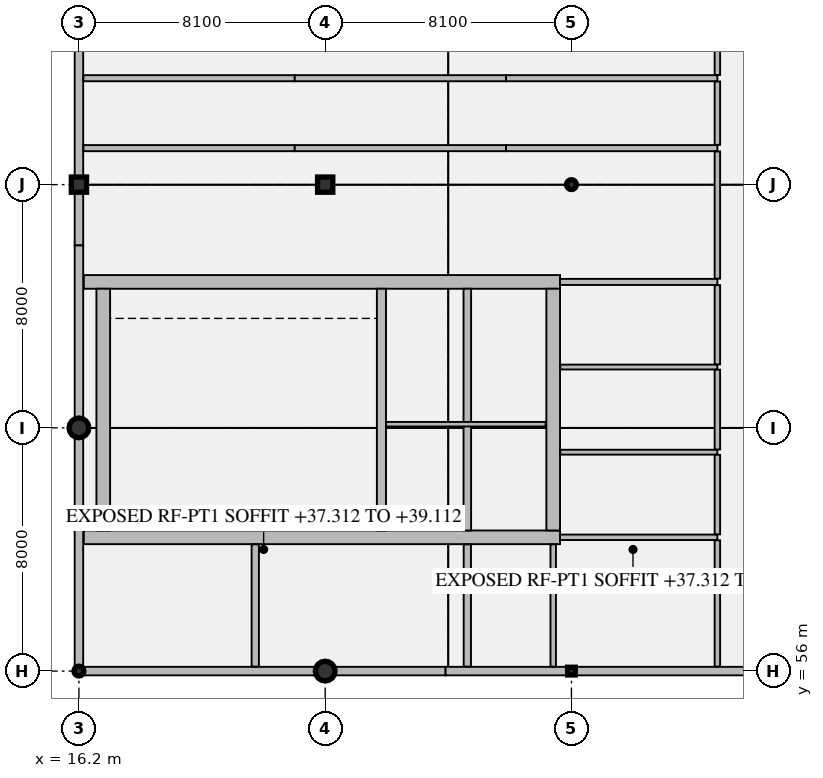
"""IFC4 building model, lengths in metres.
Left out: names, types, materials, properties, quantities, classifications, styles, units other than length and angle.
Written with IfcOpenShell. Run it as: python <this file> out.ifc"""

import sys

from ifc_helpers import new_model, si_unit, direction, frame, frame_2d, origin, origin_2d, place, context, subcontext, project, spatial, rectangle, hollow_rectangle, circle, hollow_circle, extrude, element, fill, save


model = new_model("IFC4")
c1 = context("Model", 3, precision=1e-05, world=origin(), true_north=direction((0.0, 1.0)))
c2 = subcontext(c1, "Body", "Model", "MODEL_VIEW")
j1 = project(units=[si_unit("LENGTHUNIT", "METRE"), si_unit("PLANEANGLEUNIT", "RADIAN")], contexts=[c1])
p1 = place(None, origin())
s1 = spatial("IfcSite", under=j1, at=p1, CompositionType="ELEMENT")
p2 = place(p1, origin())
s2 = spatial("IfcBuilding", under=s1, at=p2, CompositionType="ELEMENT")
p3 = place(p2, frame((0.0, 0.0, 33.3)))
s3 = spatial("IfcBuildingStorey", under=s2, at=p3, CompositionType="ELEMENT", Elevation=33.3)
p4 = place(p3, frame((16.36, 60.4, 0.0), z_axis=(0.0, 0.0, 1.0), x_axis=(1.0, 0.0, 0.0)))
e1 = element("IfcWall", 1, at=p4, inside=s3, PredefinedType="SHEAR", context=c2, shape_type="SweptSolid", body=[
    extrude(rectangle(XDim=15.665, YDim=0.45, at=frame_2d((7.833, 0.0))), origin(), (0.0, 0.0, 1.0), 3.98),
])
p5 = place(p4, frame((1.39, 0.0, 0.0)))
e2 = element("IfcOpeningElement", 2, at=p5, cuts=e1, PredefinedType="OPENING", context=c2, shape_type="SweptSolid", body=[
    extrude(rectangle(XDim=1.15, YDim=2.25, at=frame_2d((0.575, 1.125))), frame((0.0, 0.235, 0.0), z_axis=(0.0, -1.0, 0.0), x_axis=(1.0, 0.0, 0.0)), (0.0, 0.0, 1.0), 0.47),
])
p6 = place(p4, frame((10.673, 0.0, 0.0)))
e3 = element("IfcOpeningElement", 3, at=p6, cuts=e1, PredefinedType="OPENING", context=c2, shape_type="SweptSolid", body=[
    extrude(rectangle(XDim=1.1, YDim=2.2, at=frame_2d((0.55, 1.1))), frame((0.0, 0.235, 0.0), z_axis=(0.0, -1.0, 0.0), x_axis=(1.0, 0.0, 0.0)), (0.0, 0.0, 1.0), 0.47),
])
p7 = place(p4, frame((13.387, 0.0, 0.0)))
e4 = element("IfcOpeningElement", 4, at=p7, cuts=e1, PredefinedType="OPENING", context=c2, shape_type="SweptSolid", body=[
    extrude(rectangle(XDim=1.1, YDim=2.2, at=frame_2d((0.55, 1.1))), frame((0.0, 0.235, 0.0), z_axis=(0.0, -1.0, 0.0), x_axis=(1.0, 0.0, 0.0)), (0.0, 0.0, 1.0), 0.47),
])
p8 = place(p3, frame((16.36, 68.8, 0.0), z_axis=(0.0, 0.0, 1.0), x_axis=(1.0, 0.0, 0.0)))
e5 = element("IfcWall", 5, at=p8, inside=s3, PredefinedType="SHEAR", context=c2, shape_type="SweptSolid", body=[
    extrude(rectangle(XDim=15.665, YDim=0.45, at=frame_2d((7.833, 0.0))), origin(), (0.0, 0.0, 1.0), 3.98),
])
for number, where, z_axis, x_axis in (
    (6, (17.0, 60.625, 0.0), (0.0, 0.0, 1.0), (0.0, 1.0, 0.0)),
    (7, (31.8, 60.625, 0.0), (0.0, 0.0, 1.0), (0.0, 1.0, 0.0)),
):
    element("IfcWall", number, at=place(p3, frame(where, z_axis=z_axis, x_axis=x_axis)), inside=s3, PredefinedType="SHEAR", context=c2, shape_type="SweptSolid", body=[
        extrude(rectangle(XDim=7.95, YDim=0.45, at=frame_2d((3.975, 0.0))), origin(), (0.0, 0.0, 1.0), 3.98),
    ])
p9 = place(p3, frame((26.15, 60.625, 0.0), z_axis=(0.0, 0.0, 1.0), x_axis=(0.0, 1.0, 0.0)))
e8 = element("IfcWall", 8, at=p9, inside=s3, PredefinedType="SHEAR", context=c2, shape_type="SweptSolid", body=[
    extrude(rectangle(XDim=7.95, YDim=0.3, at=frame_2d((3.975, 0.0))), origin(), (0.0, 0.0, 1.0), 3.98),
])
p10 = place(p3, frame((28.975, 60.625, 0.0), z_axis=(0.0, 0.0, 1.0), x_axis=(0.0, 1.0, 0.0)))
e9 = element("IfcWall", 9, at=p10, inside=s3, PredefinedType="SHEAR", context=c2, shape_type="SweptSolid", body=[
    extrude(rectangle(XDim=7.95, YDim=0.25, at=frame_2d((3.975, 0.0))), origin(), (0.0, 0.0, 1.0), 3.98),
])
p11 = place(p3, frame((16.2, 56.0, 0.0), z_axis=(0.0, 0.0, 1.0), x_axis=(1.0, 0.0, 0.0)))
e10 = element("IfcColumn", 10, at=p11, inside=s3, PredefinedType="COLUMN", context=c2, shape_type="SweptSolid", body=[
    extrude(hollow_circle(Radius=0.162, WallThickness=0.013, at=origin_2d()), origin(), (0.0, 0.0, 1.0), 3.98),
])
p12 = place(p3, frame((16.2, 64.0, 0.0), z_axis=(0.0, 0.0, 1.0), x_axis=(1.0, 0.0, 0.0)))
e11 = element("IfcColumn", 11, at=p12, inside=s3, PredefinedType="COLUMN", context=c2, shape_type="SweptSolid", body=[
    extrude(circle(Radius=0.325, at=origin_2d()), origin(), (0.0, 0.0, 1.0), 3.98),
])
p13 = place(p3, frame((16.2, 72.0, 0.0), z_axis=(0.0, 0.0, 1.0), x_axis=(1.0, 0.0, 0.0)))
e12 = element("IfcColumn", 12, at=p13, inside=s3, PredefinedType="COLUMN", context=c2, shape_type="SweptSolid", body=[
    extrude(rectangle(XDim=0.5, YDim=0.5, at=origin_2d()), origin(), (0.0, 0.0, 1.0), 3.98),
])
p14 = place(p3, frame((24.3, 56.0, 0.0), z_axis=(0.0, 0.0, 1.0), x_axis=(1.0, 0.0, 0.0)))
e13 = element("IfcColumn", 13, at=p14, inside=s3, PredefinedType="COLUMN", context=c2, shape_type="SweptSolid", body=[
    extrude(circle(Radius=0.325, at=origin_2d()), origin(), (0.0, 0.0, 1.0), 3.98),
])
p15 = place(p3, frame((24.3, 72.0, 0.0), z_axis=(0.0, 0.0, 1.0), x_axis=(1.0, 0.0, 0.0)))
e14 = element("IfcColumn", 14, at=p15, inside=s3, PredefinedType="COLUMN", context=c2, shape_type="SweptSolid", body=[
    extrude(rectangle(XDim=0.5, YDim=0.5, at=origin_2d()), origin(), (0.0, 0.0, 1.0), 3.98),
])
p16 = place(p3, frame((32.4, 56.0, 0.0), z_axis=(0.0, 0.0, 1.0), x_axis=(1.0, 0.0, 0.0)))
e15 = element("IfcColumn", 15, at=p16, inside=s3, PredefinedType="COLUMN", context=c2, shape_type="SweptSolid", body=[
    extrude(hollow_rectangle(XDim=0.254, YDim=0.254, WallThickness=0.013, InnerFilletRadius=0.013, OuterFilletRadius=0.025, at=origin_2d()), origin(), (0.0, 0.0, 1.0), 3.98),
])
p17 = place(p3, frame((32.4, 72.0, 0.0), z_axis=(0.0, 0.0, 1.0), x_axis=(1.0, 0.0, 0.0)))
e16 = element("IfcColumn", 16, at=p17, inside=s3, PredefinedType="COLUMN", context=c2, shape_type="SweptSolid", body=[
    extrude(hollow_circle(Radius=0.162, WallThickness=0.013, at=origin_2d()), origin(), (0.0, 0.0, 1.0), 3.98),
])
for number, where, z_axis, x_axis in (
    (17, (16.2, 84.0, 0.0), (0.0, 0.0, 1.0), (0.0, -1.0, 0.0)),
    (18, (16.2, 70.0, 0.0), (0.0, 0.0, 1.0), (0.0, -1.0, 0.0)),
):
    element("IfcWall", number, at=place(p3, frame(where, z_axis=z_axis, x_axis=x_axis)), inside=s3, PredefinedType="SOLIDWALL", context=c2, shape_type="SweptSolid", body=[
        extrude(rectangle(XDim=14.0, YDim=0.28, at=frame_2d((7.0, 0.0))), origin(), (0.0, 0.0, 1.0), 3.655),
    ])
p18 = place(p3, frame((16.2, 56.0, 0.0), z_axis=(0.0, 0.0, 1.0), x_axis=(1.0, 0.0, 0.0)))
e19 = element("IfcWall", 19, at=p18, inside=s3, PredefinedType="SOLIDWALL", context=c2, shape_type="SweptSolid", body=[
    extrude(rectangle(XDim=12.06, YDim=0.28, at=frame_2d((6.03, 0.0))), origin(), (0.0, 0.0, 1.0), 3.655),
])
p19 = place(p18, frame((3.15, 0.0, 0.95)))
e20 = element("IfcOpeningElement", 20, at=p19, cuts=e19, PredefinedType="OPENING", context=c2, shape_type="SweptSolid", body=[
    extrude(rectangle(XDim=1.8, YDim=1.8, at=frame_2d((0.9, 0.9))), frame((0.0, 0.15, 0.0), z_axis=(0.0, -1.0, 0.0), x_axis=(1.0, 0.0, 0.0)), (0.0, 0.0, 1.0), 0.3),
])
p20 = place(p3, frame((28.26, 56.0, 0.0), z_axis=(0.0, 0.0, 1.0), x_axis=(1.0, 0.0, 0.0)))
e21 = element("IfcWall", 21, at=p20, inside=s3, PredefinedType="SOLIDWALL", context=c2, shape_type="SweptSolid", body=[
    extrude(rectangle(XDim=12.06, YDim=0.28, at=frame_2d((6.03, 0.0))), origin(), (0.0, 0.0, 1.0), 3.655),
])
p21 = place(p3, frame((18.0, 68.8, 3.98), z_axis=(0.0, 0.0, 1.0), x_axis=(1.0, 0.0, 0.0)))
e22 = element("IfcWall", 22, at=p21, inside=s3, PredefinedType="PARAPET", context=c2, shape_type="SweptSolid", body=[
    extrude(rectangle(XDim=12.8, YDim=0.22, at=frame_2d((6.4, 0.0))), origin(), (0.0, 0.0, 1.0), 2.17),
])
p22 = place(p3, frame((26.3, 64.12, 0.0), z_axis=(0.0, 0.0, 1.0), x_axis=(1.0, 0.0, 0.0)))
e23 = element("IfcWall", 23, at=p22, inside=s3, PredefinedType="PARTITIONING", context=c2, shape_type="SweptSolid", body=[
    extrude(rectangle(XDim=5.25, YDim=0.15, at=frame_2d((2.625, 0.0))), origin(), (0.0, 0.0, 1.0), 3.98),
])
for number, where, z_axis, x_axis in (
    (24, (16.348, 73.2, 0.0), (0.0, 0.0, 1.0), (1.0, 0.0, 0.0)),
    (25, (23.299, 73.2, 0.0), (0.0, 0.0, 1.0), (1.0, 0.0, 0.0)),
    (26, (30.249, 73.2, 0.0), (0.0, 0.0, 1.0), (1.0, 0.0, 0.0)),
    (27, (16.348, 75.5, 0.0), (0.0, 0.0, 1.0), (1.0, 0.0, 0.0)),
    (28, (23.299, 75.5, 0.0), (0.0, 0.0, 1.0), (1.0, 0.0, 0.0)),
    (29, (30.249, 75.5, 0.0), (0.0, 0.0, 1.0), (1.0, 0.0, 0.0)),
):
    element("IfcWall", number, at=place(p3, frame(where, z_axis=z_axis, x_axis=x_axis)), inside=s3, PredefinedType="PARTITIONING", context=c2, shape_type="SweptSolid", body=[
        extrude(rectangle(XDim=6.951, YDim=0.2, at=frame_2d((3.475, 0.0))), origin(), (0.0, 0.0, 1.0), 3.98),
    ])
p23 = place(p3, frame((32.025, 60.4, 0.0), z_axis=(0.0, 0.0, 1.0), x_axis=(1.0, 0.0, 0.0)))
e30 = element("IfcWall", 30, at=p23, inside=s3, PredefinedType="PARTITIONING", context=c2, shape_type="SweptSolid", body=[
    extrude(rectangle(XDim=5.175, YDim=0.18, at=frame_2d((2.587, 0.0))), origin(), (0.0, 0.0, 1.0), 3.98),
])
for number, where, z_axis, x_axis in (
    (31, (32.033, 63.2, 0.0), (0.0, 0.0, 1.0), (1.0, 0.0, 0.0)),
    (32, (32.033, 66.0, 0.0), (0.0, 0.0, 1.0), (1.0, 0.0, 0.0)),
):
    element("IfcWall", number, at=place(p3, frame(where, z_axis=z_axis, x_axis=x_axis)), inside=s3, PredefinedType="PARTITIONING", context=c2, shape_type="SweptSolid", body=[
        extrude(rectangle(XDim=5.167, YDim=0.16, at=frame_2d((2.583, 0.0))), origin(), (0.0, 0.0, 1.0), 3.98),
    ])
p24 = place(p3, frame((32.025, 68.8, 0.0), z_axis=(0.0, 0.0, 1.0), x_axis=(1.0, 0.0, 0.0)))
e33 = element("IfcWall", 33, at=p24, inside=s3, PredefinedType="PARTITIONING", context=c2, shape_type="SweptSolid", body=[
    extrude(rectangle(XDim=5.175, YDim=0.2, at=frame_2d((2.587, 0.0))), origin(), (0.0, 0.0, 1.0), 3.98),
])
p25 = place(p3, frame((22.0, 56.148, 0.0), z_axis=(0.0, 0.0, 1.0), x_axis=(0.0, 1.0, 0.0)))
e34 = element("IfcWall", 34, at=p25, inside=s3, PredefinedType="PARTITIONING", context=c2, shape_type="SweptSolid", body=[
    extrude(rectangle(XDim=4.019, YDim=0.24, at=frame_2d((2.01, 0.0))), origin(), (0.0, 0.0, 1.0), 3.98),
])
p26 = place(p25, frame((1.459, 0.0, 0.0)))
e35 = element("IfcOpeningElement", 35, at=p26, cuts=e34, PredefinedType="OPENING", context=c2, shape_type="SweptSolid", body=[
    extrude(rectangle(XDim=1.1, YDim=2.2, at=frame_2d((0.55, 1.1))), frame((0.0, 0.13, 0.0), z_axis=(0.0, -1.0, 0.0), x_axis=(1.0, 0.0, 0.0)), (0.0, 0.0, 1.0), 0.26),
])
p27 = place(p3, frame((28.975, 56.148, 0.0), z_axis=(0.0, 0.0, 1.0), x_axis=(0.0, 1.0, 0.0)))
e36 = element("IfcWall", 36, at=p27, inside=s3, PredefinedType="PARTITIONING", context=c2, shape_type="SweptSolid", body=[
    extrude(rectangle(XDim=4.019, YDim=0.24, at=frame_2d((2.01, 0.0))), origin(), (0.0, 0.0, 1.0), 3.98),
])
p28 = place(p3, frame((31.8, 56.148, 0.0), z_axis=(0.0, 0.0, 1.0), x_axis=(0.0, 1.0, 0.0)))
e37 = element("IfcWall", 37, at=p28, inside=s3, PredefinedType="PARTITIONING", context=c2, shape_type="SweptSolid", body=[
    extrude(rectangle(XDim=4.019, YDim=0.18, at=frame_2d((2.01, 0.0))), origin(), (0.0, 0.0, 1.0), 3.98),
])
p29 = place(p28, frame((1.459, 0.0, 0.0)))
e38 = element("IfcOpeningElement", 38, at=p29, cuts=e37, PredefinedType="OPENING", context=c2, shape_type="SweptSolid", body=[
    extrude(rectangle(XDim=1.1, YDim=2.2, at=frame_2d((0.55, 1.1))), frame((0.0, 0.1, 0.0), z_axis=(0.0, -1.0, 0.0), x_axis=(1.0, 0.0, 0.0)), (0.0, 0.0, 1.0), 0.2),
])
p30 = place(p3, frame((37.2, 56.148, 0.0), z_axis=(0.0, 0.0, 1.0), x_axis=(0.0, 1.0, 0.0)))
e39 = element("IfcWall", 39, at=p30, inside=s3, PredefinedType="PARTITIONING", context=c2, shape_type="SweptSolid", body=[
    extrude(rectangle(XDim=4.154, YDim=0.18, at=frame_2d((2.077, 0.0))), origin(), (0.0, 0.0, 1.0), 3.98),
])
p31 = place(p30, frame((1.527, 0.0, 0.0)))
e40 = element("IfcOpeningElement", 40, at=p31, cuts=e39, PredefinedType="OPENING", context=c2, shape_type="SweptSolid", body=[
    extrude(rectangle(XDim=1.1, YDim=2.2, at=frame_2d((0.55, 1.1))), frame((0.0, 0.1, 0.0), z_axis=(0.0, -1.0, 0.0), x_axis=(1.0, 0.0, 0.0)), (0.0, 0.0, 1.0), 0.2),
])
p32 = place(p3, frame((37.2, 60.498, 0.0), z_axis=(0.0, 0.0, 1.0), x_axis=(0.0, 1.0, 0.0)))
e41 = element("IfcWall", 41, at=p32, inside=s3, PredefinedType="PARTITIONING", context=c2, shape_type="SweptSolid", body=[
    extrude(rectangle(XDim=2.614, YDim=0.18, at=frame_2d((1.307, 0.0))), origin(), (0.0, 0.0, 1.0), 3.98),
])
p33 = place(p32, frame((0.832, 0.0, 0.0)))
e42 = element("IfcOpeningElement", 42, at=p33, cuts=e41, PredefinedType="OPENING", context=c2, shape_type="SweptSolid", body=[
    extrude(rectangle(XDim=0.95, YDim=2.1, at=frame_2d((0.475, 1.05))), frame((0.0, 0.1, 0.0), z_axis=(0.0, -1.0, 0.0), x_axis=(1.0, 0.0, 0.0)), (0.0, 0.0, 1.0), 0.2),
])
p34 = place(p3, frame((37.2, 63.288, 0.0), z_axis=(0.0, 0.0, 1.0), x_axis=(0.0, 1.0, 0.0)))
e43 = element("IfcWall", 43, at=p34, inside=s3, PredefinedType="PARTITIONING", context=c2, shape_type="SweptSolid", body=[
    extrude(rectangle(XDim=2.624, YDim=0.18, at=frame_2d((1.312, 0.0))), origin(), (0.0, 0.0, 1.0), 3.98),
])
p35 = place(p34, frame((0.837, 0.0, 0.0)))
e44 = element("IfcOpeningElement", 44, at=p35, cuts=e43, PredefinedType="OPENING", context=c2, shape_type="SweptSolid", body=[
    extrude(rectangle(XDim=0.95, YDim=2.1, at=frame_2d((0.475, 1.05))), frame((0.0, 0.1, 0.0), z_axis=(0.0, -1.0, 0.0), x_axis=(1.0, 0.0, 0.0)), (0.0, 0.0, 1.0), 0.2),
])
p36 = place(p3, frame((37.2, 66.088, 0.0), z_axis=(0.0, 0.0, 1.0), x_axis=(0.0, 1.0, 0.0)))
e45 = element("IfcWall", 45, at=p36, inside=s3, PredefinedType="PARTITIONING", context=c2, shape_type="SweptSolid", body=[
    extrude(rectangle(XDim=2.604, YDim=0.18, at=frame_2d((1.302, 0.0))), origin(), (0.0, 0.0, 1.0), 3.98),
])
p37 = place(p36, frame((0.802, 0.0, 0.0)))
e46 = element("IfcOpeningElement", 46, at=p37, cuts=e45, PredefinedType="OPENING", context=c2, shape_type="SweptSolid", body=[
    extrude(rectangle(XDim=1.0, YDim=2.15, at=frame_2d((0.5, 1.075))), frame((0.0, 0.1, 0.0), z_axis=(0.0, -1.0, 0.0), x_axis=(1.0, 0.0, 0.0)), (0.0, 0.0, 1.0), 0.2),
])
p38 = place(p3, frame((37.2, 68.908, 0.0), z_axis=(0.0, 0.0, 1.0), x_axis=(0.0, 1.0, 0.0)))
e47 = element("IfcWall", 47, at=p38, inside=s3, PredefinedType="PARTITIONING", context=c2, shape_type="SweptSolid", body=[
    extrude(rectangle(XDim=4.184, YDim=0.18, at=frame_2d((2.092, 0.0))), origin(), (0.0, 0.0, 1.0), 3.98),
])
p39 = place(p38, frame((1.542, 0.0, 0.0)))
e48 = element("IfcOpeningElement", 48, at=p39, cuts=e47, PredefinedType="OPENING", context=c2, shape_type="SweptSolid", body=[
    extrude(rectangle(XDim=1.1, YDim=2.2, at=frame_2d((0.55, 1.1))), frame((0.0, 0.1, 0.0), z_axis=(0.0, -1.0, 0.0), x_axis=(1.0, 0.0, 0.0)), (0.0, 0.0, 1.0), 0.2),
])
p40 = place(p3, frame((37.2, 73.308, 0.0), z_axis=(0.0, 0.0, 1.0), x_axis=(0.0, 1.0, 0.0)))
e49 = element("IfcWall", 49, at=p40, inside=s3, PredefinedType="PARTITIONING", context=c2, shape_type="SweptSolid", body=[
    extrude(rectangle(XDim=2.084, YDim=0.18, at=frame_2d((1.042, 0.0))), origin(), (0.0, 0.0, 1.0), 3.98),
])
p41 = place(p40, frame((0.492, 0.0, 0.0)))
e50 = element("IfcOpeningElement", 50, at=p41, cuts=e49, PredefinedType="OPENING", context=c2, shape_type="SweptSolid", body=[
    extrude(rectangle(XDim=1.1, YDim=2.2, at=frame_2d((0.55, 1.1))), frame((0.0, 0.1, 0.0), z_axis=(0.0, -1.0, 0.0), x_axis=(1.0, 0.0, 0.0)), (0.0, 0.0, 1.0), 0.2),
])
p42 = place(p3, frame((37.2, 75.608, 0.0), z_axis=(0.0, 0.0, 1.0), x_axis=(0.0, 1.0, 0.0)))
e51 = element("IfcWall", 51, at=p42, inside=s3, PredefinedType="PARTITIONING", context=c2, shape_type="SweptSolid", body=[
    extrude(rectangle(XDim=6.329, YDim=0.18, at=frame_2d((3.165, 0.0))), origin(), (0.0, 0.0, 1.0), 3.98),
])
p43 = place(p42, frame((2.665, 0.0, 0.0)))
e52 = element("IfcOpeningElement", 52, at=p43, cuts=e51, PredefinedType="OPENING", context=c2, shape_type="SweptSolid", body=[
    extrude(rectangle(XDim=1.0, YDim=2.2, at=frame_2d((0.5, 1.1))), frame((0.0, 0.1, 0.0), z_axis=(0.0, -1.0, 0.0), x_axis=(1.0, 0.0, 0.0)), (0.0, 0.0, 1.0), 0.2),
])
p44 = place(p19, origin())
e53 = element("IfcWindow", 53, at=p44, inside=s3, PartitioningType="DOUBLE_PANEL_VERTICAL", PredefinedType="WINDOW", context=c2, shape_type="SweptSolid", body=[
    extrude(rectangle(XDim=1.8, YDim=1.8, at=frame_2d((0.9, 0.9))), frame((0.0, 0.03, 0.0), z_axis=(0.0, -1.0, 0.0), x_axis=(1.0, 0.0, 0.0)), (0.0, 0.0, 1.0), 0.06),
])
fill(e20, e53)
p45 = place(p5, origin())
e54 = element("IfcDoor", 54, at=p45, inside=s3, OperationType="SINGLE_SWING_LEFT", PredefinedType="DOOR", context=c2, shape_type="SweptSolid", body=[
    extrude(rectangle(XDim=1.15, YDim=2.25, at=frame_2d((0.575, 1.125))), frame((0.0, 0.025, 0.0), z_axis=(0.0, -1.0, 0.0), x_axis=(1.0, 0.0, 0.0)), (0.0, 0.0, 1.0), 0.05),
])
fill(e2, e54)
p46 = place(p6, frame((1.1, 0.0, 0.0), z_axis=(0.0, 0.0, 1.0), x_axis=(-1.0, 0.0, 0.0)))
e55 = element("IfcDoor", 55, at=p46, inside=s3, OperationType="DOUBLE_DOOR_SLIDING", PredefinedType="DOOR", context=c2, shape_type="SweptSolid", body=[
    extrude(rectangle(XDim=1.1, YDim=2.2, at=frame_2d((0.55, 1.1))), frame((0.0, 0.025, 0.0), z_axis=(0.0, -1.0, 0.0), x_axis=(1.0, 0.0, 0.0)), (0.0, 0.0, 1.0), 0.05),
])
fill(e3, e55)
p47 = place(p7, frame((1.1, 0.0, 0.0), z_axis=(0.0, 0.0, 1.0), x_axis=(-1.0, 0.0, 0.0)))
e56 = element("IfcDoor", 56, at=p47, inside=s3, OperationType="DOUBLE_DOOR_SLIDING", PredefinedType="DOOR", context=c2, shape_type="SweptSolid", body=[
    extrude(rectangle(XDim=1.1, YDim=2.2, at=frame_2d((0.55, 1.1))), frame((0.0, 0.025, 0.0), z_axis=(0.0, -1.0, 0.0), x_axis=(1.0, 0.0, 0.0)), (0.0, 0.0, 1.0), 0.05),
])
fill(e4, e56)
p48 = place(p26, frame((1.1, 0.0, 0.0), z_axis=(0.0, 0.0, 1.0), x_axis=(-1.0, 0.0, 0.0)))
e57 = element("IfcDoor", 57, at=p48, inside=s3, OperationType="SINGLE_SWING_LEFT", PredefinedType="DOOR", context=c2, shape_type="SweptSolid", body=[
    extrude(rectangle(XDim=1.1, YDim=2.2, at=frame_2d((0.55, 1.1))), frame((0.0, 0.025, 0.0), z_axis=(0.0, -1.0, 0.0), x_axis=(1.0, 0.0, 0.0)), (0.0, 0.0, 1.0), 0.05),
])
fill(e35, e57)
p49 = place(p29, frame((1.1, 0.0, 0.0), z_axis=(0.0, 0.0, 1.0), x_axis=(-1.0, 0.0, 0.0)))
e58 = element("IfcDoor", 58, at=p49, inside=s3, OperationType="SINGLE_SWING_LEFT", PredefinedType="DOOR", context=c2, shape_type="SweptSolid", body=[
    extrude(rectangle(XDim=1.1, YDim=2.2, at=frame_2d((0.55, 1.1))), frame((0.0, 0.025, 0.0), z_axis=(0.0, -1.0, 0.0), x_axis=(1.0, 0.0, 0.0)), (0.0, 0.0, 1.0), 0.05),
])
fill(e38, e58)
p50 = place(p31, origin())
e59 = element("IfcDoor", 59, at=p50, inside=s3, OperationType="SINGLE_SWING_RIGHT", PredefinedType="DOOR", context=c2, shape_type="SweptSolid", body=[
    extrude(rectangle(XDim=1.1, YDim=2.2, at=frame_2d((0.55, 1.1))), frame((0.0, 0.025, 0.0), z_axis=(0.0, -1.0, 0.0), x_axis=(1.0, 0.0, 0.0)), (0.0, 0.0, 1.0), 0.05),
])
fill(e40, e59)
p51 = place(p33, origin())
e60 = element("IfcDoor", 60, at=p51, inside=s3, OperationType="SINGLE_SWING_LEFT", PredefinedType="DOOR", context=c2, shape_type="SweptSolid", body=[
    extrude(rectangle(XDim=0.95, YDim=2.1, at=frame_2d((0.475, 1.05))), frame((0.0, 0.025, 0.0), z_axis=(0.0, -1.0, 0.0), x_axis=(1.0, 0.0, 0.0)), (0.0, 0.0, 1.0), 0.05),
])
fill(e42, e60)
p52 = place(p35, origin())
e61 = element("IfcDoor", 61, at=p52, inside=s3, OperationType="SINGLE_SWING_RIGHT", PredefinedType="DOOR", context=c2, shape_type="SweptSolid", body=[
    extrude(rectangle(XDim=0.95, YDim=2.1, at=frame_2d((0.475, 1.05))), frame((0.0, 0.025, 0.0), z_axis=(0.0, -1.0, 0.0), x_axis=(1.0, 0.0, 0.0)), (0.0, 0.0, 1.0), 0.05),
])
fill(e44, e61)
p53 = place(p37, origin())
e62 = element("IfcDoor", 62, at=p53, inside=s3, OperationType="SINGLE_SWING_LEFT", PredefinedType="DOOR", context=c2, shape_type="SweptSolid", body=[
    extrude(rectangle(XDim=1.0, YDim=2.15, at=frame_2d((0.5, 1.075))), frame((0.0, 0.025, 0.0), z_axis=(0.0, -1.0, 0.0), x_axis=(1.0, 0.0, 0.0)), (0.0, 0.0, 1.0), 0.05),
])
fill(e46, e62)
p54 = place(p39, origin())
e63 = element("IfcDoor", 63, at=p54, inside=s3, OperationType="SINGLE_SWING_RIGHT", PredefinedType="DOOR", context=c2, shape_type="SweptSolid", body=[
    extrude(rectangle(XDim=1.1, YDim=2.2, at=frame_2d((0.55, 1.1))), frame((0.0, 0.025, 0.0), z_axis=(0.0, -1.0, 0.0), x_axis=(1.0, 0.0, 0.0)), (0.0, 0.0, 1.0), 0.05),
])
fill(e48, e63)
p55 = place(p41, origin())
e64 = element("IfcDoor", 64, at=p55, inside=s3, OperationType="SINGLE_SWING_LEFT", PredefinedType="DOOR", context=c2, shape_type="SweptSolid", body=[
    extrude(rectangle(XDim=1.1, YDim=2.2, at=frame_2d((0.55, 1.1))), frame((0.0, 0.025, 0.0), z_axis=(0.0, -1.0, 0.0), x_axis=(1.0, 0.0, 0.0)), (0.0, 0.0, 1.0), 0.05),
])
fill(e50, e64)
save(model, sys.argv[1])
